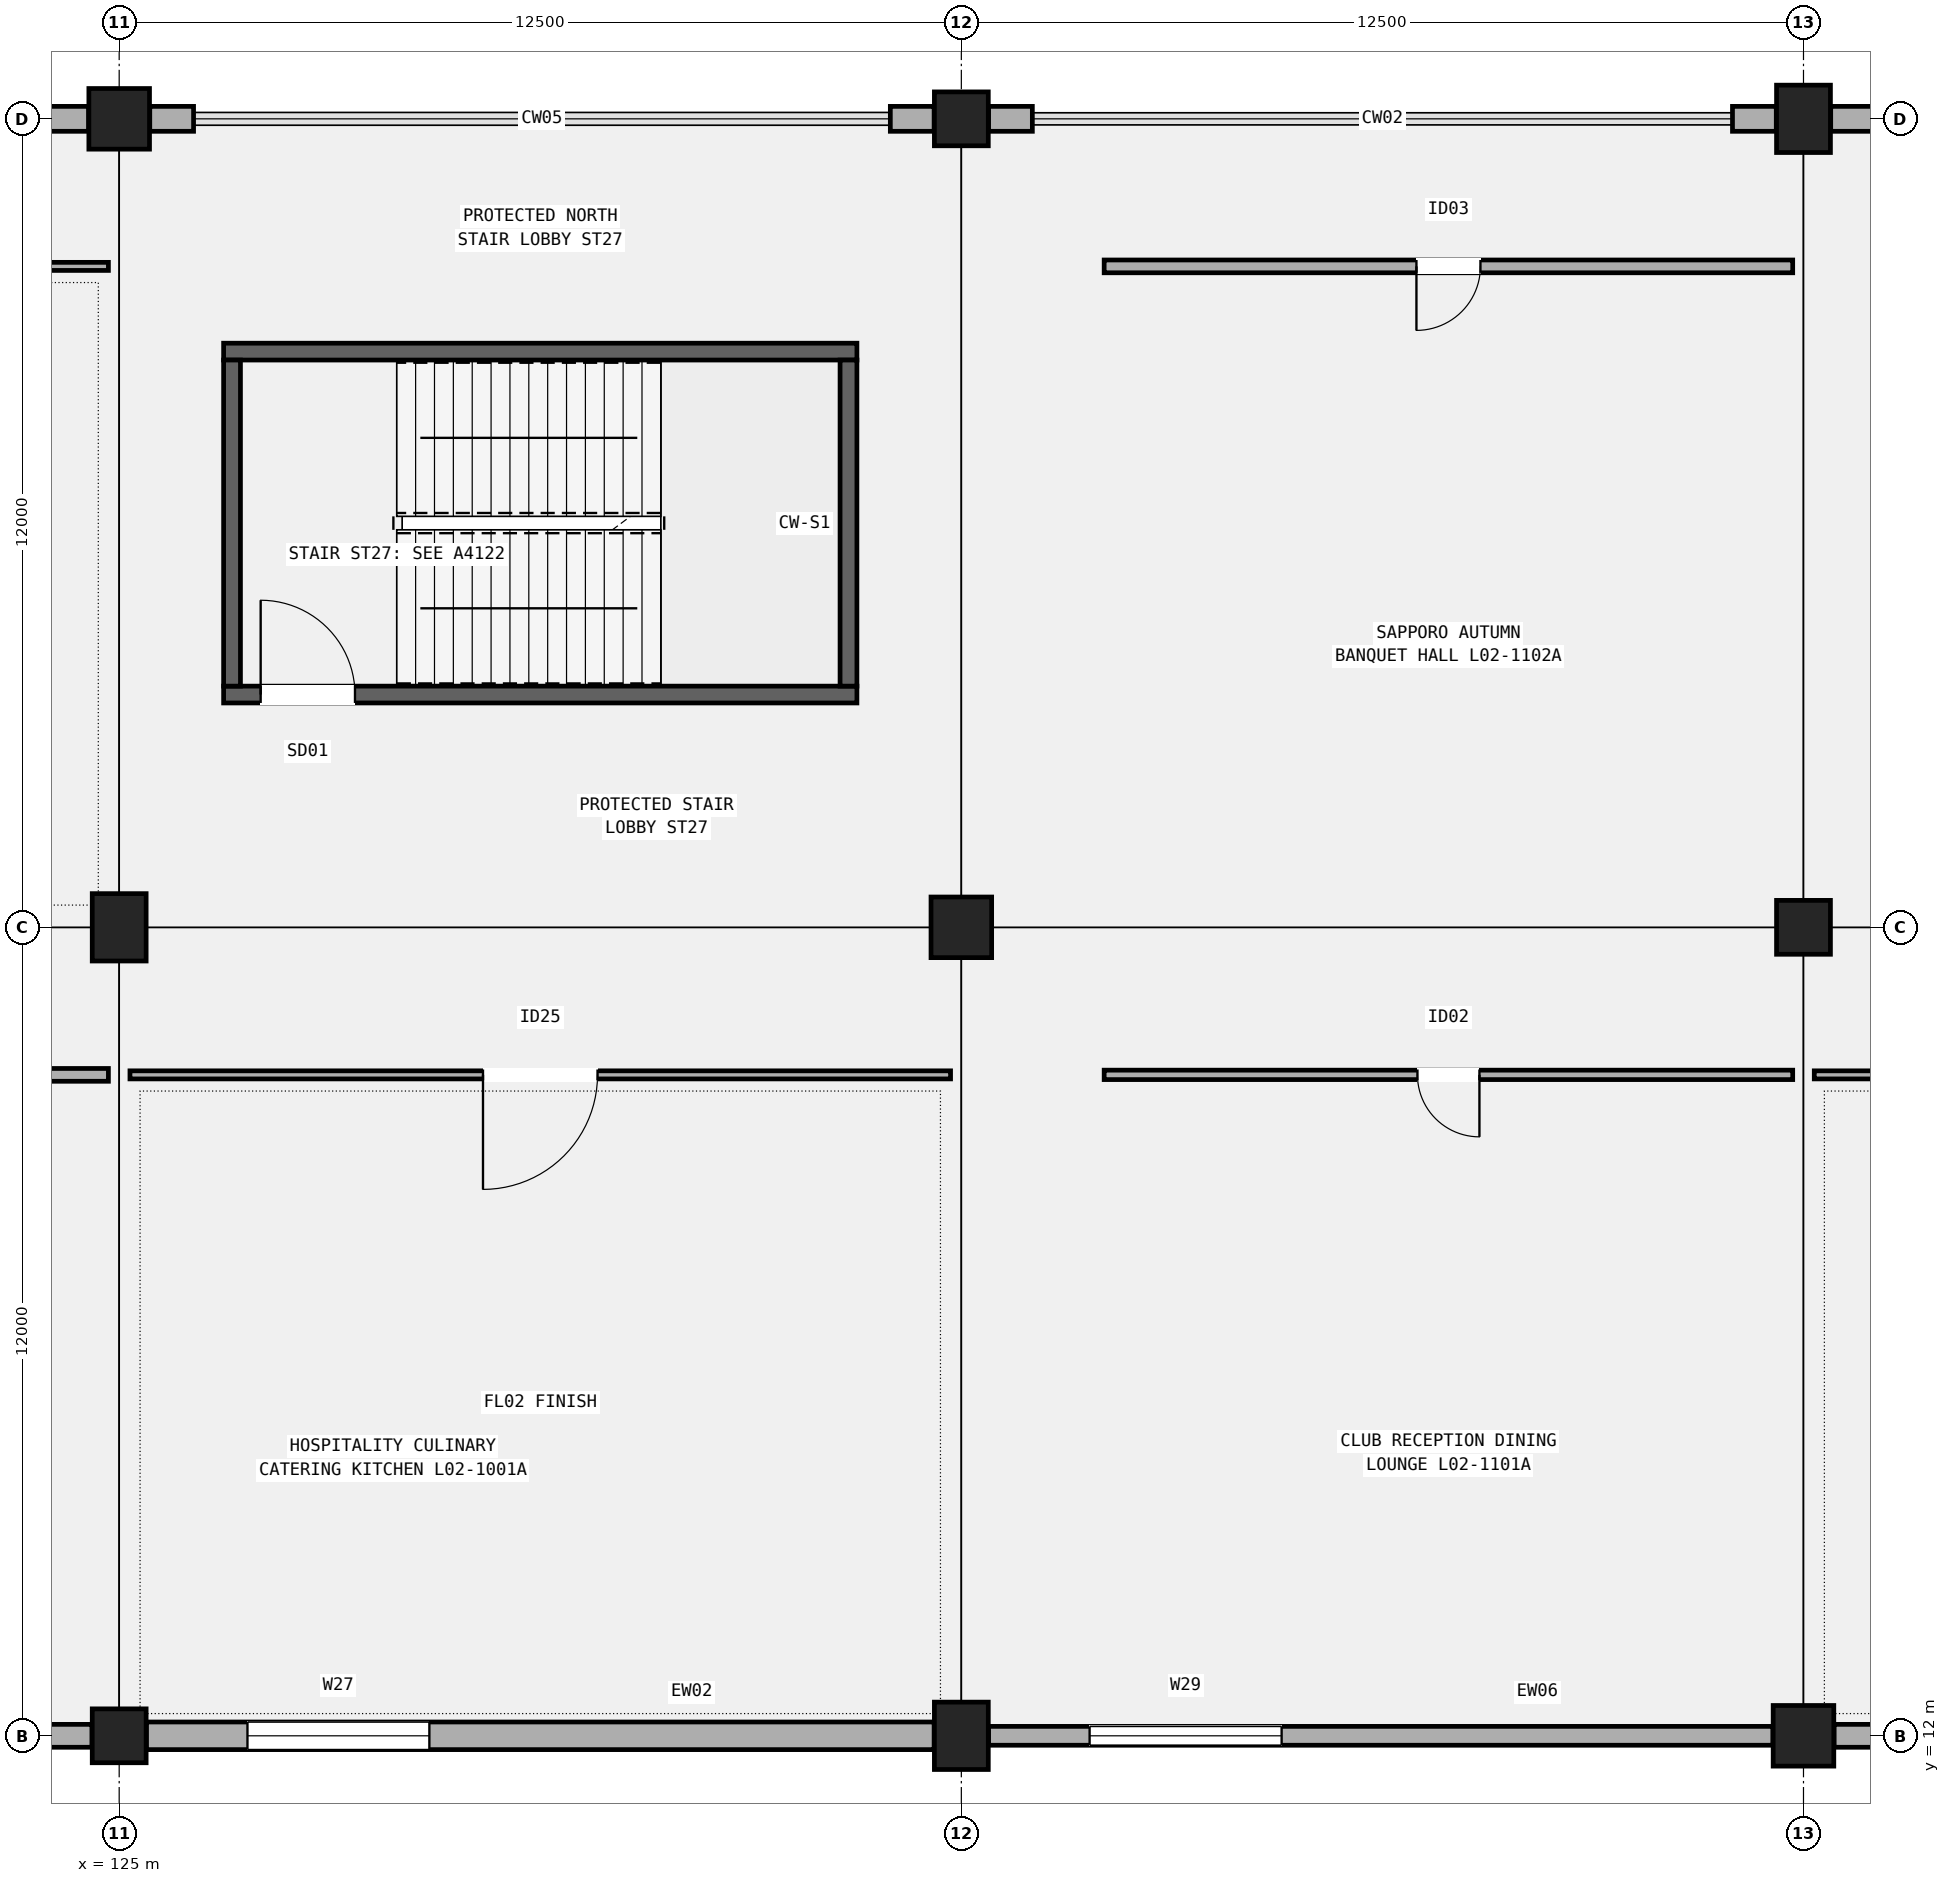
"""IFC4 building model, lengths in metres.
Left out: names, types, materials, properties, quantities, classifications, styles, units other than length and angle.
Written with IfcOpenShell. Run it as: python <this file> out.ifc"""

import sys

from ifc_helpers import new_model, si_unit, direction, frame, frame_2d, origin, origin_2d, place, context, subcontext, project, spatial, rectangle, extrude, element, fill, save


model = new_model("IFC4")
c1 = context("Model", 3, precision=1e-05, world=origin(), true_north=direction((0.0, 1.0)))
c2 = subcontext(c1, "Body", "Model", "MODEL_VIEW")
j1 = project(units=[si_unit("LENGTHUNIT", "METRE"), si_unit("PLANEANGLEUNIT", "RADIAN")], contexts=[c1])
p1 = place(None, origin())
s1 = spatial("IfcSite", under=j1, at=p1, CompositionType="ELEMENT")
p2 = place(p1, origin())
s2 = spatial("IfcBuilding", under=s1, at=p2, CompositionType="ELEMENT")
p3 = place(p2, frame((0.0, 0.0, 10.2)))
s3 = spatial("IfcBuildingStorey", under=s2, at=p3, CompositionType="ELEMENT", Elevation=10.2)
p4 = place(p3, frame((125.0, 12.0, 0.0), z_axis=(0.0, 0.0, 1.0), x_axis=(1.0, 0.0, 0.0)))
e1 = element("IfcColumn", 1, at=p4, inside=s3, PredefinedType="COLUMN", context=c2, shape_type="SweptSolid", body=[
    extrude(rectangle(XDim=0.8, YDim=0.8, at=origin_2d()), origin(), (0.0, 0.0, 1.0), 5.1),
])
p5 = place(p3, frame((125.0, 24.0, 0.0), z_axis=(0.0, 0.0, 1.0), x_axis=(1.0, 0.0, 0.0)))
e2 = element("IfcColumn", 2, at=p5, inside=s3, PredefinedType="COLUMN", context=c2, shape_type="SweptSolid", body=[
    extrude(rectangle(XDim=0.8, YDim=1.0, at=origin_2d()), origin(), (0.0, 0.0, 1.0), 5.1),
])
p6 = place(p3, frame((125.0, 36.0, 0.0), z_axis=(0.0, 0.0, 1.0), x_axis=(1.0, 0.0, 0.0)))
e3 = element("IfcColumn", 3, at=p6, inside=s3, PredefinedType="COLUMN", context=c2, shape_type="SweptSolid", body=[
    extrude(rectangle(XDim=0.9, YDim=0.9, at=origin_2d()), origin(), (0.0, 0.0, 1.0), 5.1),
])
p7 = place(p3, frame((137.5, 12.0, 0.0), z_axis=(0.0, 0.0, 1.0), x_axis=(1.0, 0.0, 0.0)))
e4 = element("IfcColumn", 4, at=p7, inside=s3, PredefinedType="COLUMN", context=c2, shape_type="SweptSolid", body=[
    extrude(rectangle(XDim=0.8, YDim=1.0, at=origin_2d()), origin(), (0.0, 0.0, 1.0), 5.1),
])
p8 = place(p3, frame((137.5, 24.0, 0.0), z_axis=(0.0, 0.0, 1.0), x_axis=(1.0, 0.0, 0.0)))
e5 = element("IfcColumn", 5, at=p8, inside=s3, PredefinedType="COLUMN", context=c2, shape_type="SweptSolid", body=[
    extrude(rectangle(XDim=0.9, YDim=0.9, at=origin_2d()), origin(), (0.0, 0.0, 1.0), 5.1),
])
p9 = place(p3, frame((137.5, 36.0, 0.0), z_axis=(0.0, 0.0, 1.0), x_axis=(1.0, 0.0, 0.0)))
e6 = element("IfcColumn", 6, at=p9, inside=s3, PredefinedType="COLUMN", context=c2, shape_type="SweptSolid", body=[
    extrude(rectangle(XDim=0.8, YDim=0.8, at=origin_2d()), origin(), (0.0, 0.0, 1.0), 5.1),
])
p10 = place(p3, frame((150.0, 12.0, 0.0), z_axis=(0.0, 0.0, 1.0), x_axis=(1.0, 0.0, 0.0)))
e7 = element("IfcColumn", 7, at=p10, inside=s3, PredefinedType="COLUMN", context=c2, shape_type="SweptSolid", body=[
    extrude(rectangle(XDim=0.9, YDim=0.9, at=origin_2d()), origin(), (0.0, 0.0, 1.0), 5.1),
])
p11 = place(p3, frame((150.0, 24.0, 0.0), z_axis=(0.0, 0.0, 1.0), x_axis=(1.0, 0.0, 0.0)))
e8 = element("IfcColumn", 8, at=p11, inside=s3, PredefinedType="COLUMN", context=c2, shape_type="SweptSolid", body=[
    extrude(rectangle(XDim=0.8, YDim=0.8, at=origin_2d()), origin(), (0.0, 0.0, 1.0), 5.1),
])
p12 = place(p3, frame((150.0, 36.0, 0.0), z_axis=(0.0, 0.0, 1.0), x_axis=(1.0, 0.0, 0.0)))
e9 = element("IfcColumn", 9, at=p12, inside=s3, PredefinedType="COLUMN", context=c2, shape_type="SweptSolid", body=[
    extrude(rectangle(XDim=0.8, YDim=1.0, at=origin_2d()), origin(), (0.0, 0.0, 1.0), 5.1),
])
p13 = place(p3, frame((112.454, 12.0, 0.0), z_axis=(0.0, 0.0, 1.0), x_axis=(1.0, 0.0, 0.0)))
e10 = element("IfcWall", 10, at=p13, inside=s3, PredefinedType="SOLIDWALL", context=c2, shape_type="SweptSolid", body=[
    extrude(rectangle(XDim=12.142, YDim=0.34, at=frame_2d((6.071, 0.0))), origin(), (0.0, 0.0, 1.0), 4.12),
])
p14 = place(p13, frame((1.5, 0.0, 0.95)))
e11 = element("IfcOpeningElement", 11, at=p14, cuts=e10, PredefinedType="OPENING", context=c2, shape_type="SweptSolid", body=[
    extrude(rectangle(XDim=2.4, YDim=2.05, at=frame_2d((1.2, 1.025))), frame((0.0, 0.18, 0.0), z_axis=(0.0, -1.0, 0.0), x_axis=(1.0, 0.0, 0.0)), (0.0, 0.0, 1.0), 0.36),
])
p15 = place(p3, frame((123.896, 36.0, 0.0), z_axis=(0.0, 0.0, 1.0), x_axis=(1.0, 0.0, 0.0)))
e12 = element("IfcWall", 12, at=p15, inside=s3, PredefinedType="SOLIDWALL", context=c2, shape_type="SweptSolid", body=[
    extrude(rectangle(XDim=0.65, YDim=0.37, at=frame_2d((0.325, 0.0))), origin(), (0.0, 0.0, 1.0), 4.02),
])
p16 = place(p3, frame((125.404, 12.0, 0.0), z_axis=(0.0, 0.0, 1.0), x_axis=(1.0, 0.0, 0.0)))
e13 = element("IfcWall", 13, at=p16, inside=s3, PredefinedType="SOLIDWALL", context=c2, shape_type="SweptSolid", body=[
    extrude(rectangle(XDim=11.692, YDim=0.41, at=frame_2d((5.846, 0.0))), origin(), (0.0, 0.0, 1.0), 4.22),
])
p17 = place(p16, frame((1.5, 0.0, 0.95)))
e14 = element("IfcOpeningElement", 14, at=p17, cuts=e13, PredefinedType="OPENING", context=c2, shape_type="SweptSolid", body=[
    extrude(rectangle(XDim=2.7, YDim=1.75, at=frame_2d((1.35, 0.875))), frame((0.0, 0.215, 0.0), z_axis=(0.0, -1.0, 0.0), x_axis=(1.0, 0.0, 0.0)), (0.0, 0.0, 1.0), 0.43),
])
for number, where, z_axis, x_axis in (
    (15, (125.454, 36.0, 0.0), (0.0, 0.0, 1.0), (1.0, 0.0, 0.0)),
    (16, (136.446, 36.0, 0.0), (0.0, 0.0, 1.0), (1.0, 0.0, 0.0)),
):
    element("IfcWall", number, at=place(p3, frame(where, z_axis=z_axis, x_axis=x_axis)), inside=s3, PredefinedType="SOLIDWALL", context=c2, shape_type="SweptSolid", body=[
        extrude(rectangle(XDim=0.65, YDim=0.37, at=frame_2d((0.325, 0.0))), origin(), (0.0, 0.0, 1.0), 4.12),
    ])
p18 = place(p3, frame((137.904, 12.0, 0.0), z_axis=(0.0, 0.0, 1.0), x_axis=(1.0, 0.0, 0.0)))
e17 = element("IfcWall", 17, at=p18, inside=s3, PredefinedType="SOLIDWALL", context=c2, shape_type="SweptSolid", body=[
    extrude(rectangle(XDim=11.642, YDim=0.28, at=frame_2d((5.821, 0.0))), origin(), (0.0, 0.0, 1.0), 4.02),
])
p19 = place(p18, frame((1.5, 0.0, 0.95)))
e18 = element("IfcOpeningElement", 18, at=p19, cuts=e17, PredefinedType="OPENING", context=c2, shape_type="SweptSolid", body=[
    extrude(rectangle(XDim=2.85, YDim=2.0, at=frame_2d((1.425, 1.0))), frame((0.0, 0.15, 0.0), z_axis=(0.0, -1.0, 0.0), x_axis=(1.0, 0.0, 0.0)), (0.0, 0.0, 1.0), 0.3),
])
for number, where, z_axis, x_axis in (
    (19, (137.904, 36.0, 0.0), (0.0, 0.0, 1.0), (1.0, 0.0, 0.0)),
    (20, (148.946, 36.0, 0.0), (0.0, 0.0, 1.0), (1.0, 0.0, 0.0)),
):
    element("IfcWall", number, at=place(p3, frame(where, z_axis=z_axis, x_axis=x_axis)), inside=s3, PredefinedType="SOLIDWALL", context=c2, shape_type="SweptSolid", body=[
        extrude(rectangle(XDim=0.65, YDim=0.37, at=frame_2d((0.325, 0.0))), origin(), (0.0, 0.0, 1.0), 4.22),
    ])
p20 = place(p3, frame((150.454, 12.0, 0.0), z_axis=(0.0, 0.0, 1.0), x_axis=(1.0, 0.0, 0.0)))
e21 = element("IfcWall", 21, at=p20, inside=s3, PredefinedType="SOLIDWALL", context=c2, shape_type="SweptSolid", body=[
    extrude(rectangle(XDim=11.642, YDim=0.34, at=frame_2d((5.821, 0.0))), origin(), (0.0, 0.0, 1.0), 4.12),
])
p21 = place(p20, frame((1.5, 0.0, 0.95)))
e22 = element("IfcOpeningElement", 22, at=p21, cuts=e21, PredefinedType="OPENING", context=c2, shape_type="SweptSolid", body=[
    extrude(rectangle(XDim=3.0, YDim=2.15, at=frame_2d((1.5, 1.075))), frame((0.0, 0.18, 0.0), z_axis=(0.0, -1.0, 0.0), x_axis=(1.0, 0.0, 0.0)), (0.0, 0.0, 1.0), 0.36),
])
p22 = place(p3, frame((150.404, 36.0, 0.0), z_axis=(0.0, 0.0, 1.0), x_axis=(1.0, 0.0, 0.0)))
e23 = element("IfcWall", 23, at=p22, inside=s3, PredefinedType="SOLIDWALL", context=c2, shape_type="SweptSolid", body=[
    extrude(rectangle(XDim=0.65, YDim=0.37, at=frame_2d((0.325, 0.0))), origin(), (0.0, 0.0, 1.0), 4.02),
])
p23 = place(p3, frame((126.55, 27.455, 0.0), z_axis=(0.0, 0.0, 1.0), x_axis=(1.0, 0.0, 0.0)))
e24 = element("IfcWall", 24, at=p23, inside=s3, PredefinedType="SHEAR", context=c2, shape_type="SweptSolid", body=[
    extrude(rectangle(XDim=9.4, YDim=0.25, at=frame_2d((4.7, 0.0))), origin(), (0.0, 0.0, 1.0), 4.82),
])
p24 = place(p23, frame((0.55, 0.0, 0.0)))
e25 = element("IfcOpeningElement", 25, at=p24, cuts=e24, PredefinedType="OPENING", context=c2, shape_type="SweptSolid", body=[
    extrude(rectangle(XDim=1.4, YDim=2.15, at=frame_2d((0.7, 1.075))), frame((0.0, 0.135, 0.0), z_axis=(0.0, -1.0, 0.0), x_axis=(1.0, 0.0, 0.0)), (0.0, 0.0, 1.0), 0.27),
])
p25 = place(p3, frame((126.55, 32.545, 0.0), z_axis=(0.0, 0.0, 1.0), x_axis=(1.0, 0.0, 0.0)))
e26 = element("IfcWall", 26, at=p25, inside=s3, PredefinedType="SHEAR", context=c2, shape_type="SweptSolid", body=[
    extrude(rectangle(XDim=9.4, YDim=0.25, at=frame_2d((4.7, 0.0))), origin(), (0.0, 0.0, 1.0), 4.82),
])
for number, where, z_axis, x_axis in (
    (27, (126.675, 27.58, 0.0), (0.0, 0.0, 1.0), (0.0, 1.0, 0.0)),
    (28, (135.825, 27.58, 0.0), (0.0, 0.0, 1.0), (0.0, 1.0, 0.0)),
):
    element("IfcWall", number, at=place(p3, frame(where, z_axis=z_axis, x_axis=x_axis)), inside=s3, PredefinedType="SHEAR", context=c2, shape_type="SweptSolid", body=[
        extrude(rectangle(XDim=4.84, YDim=0.25, at=frame_2d((2.42, 0.0))), origin(), (0.0, 0.0, 1.0), 4.82),
    ])
p26 = place(p3, frame((112.16, 21.81, 0.0), z_axis=(0.0, 0.0, 1.0), x_axis=(1.0, 0.0, 0.0)))
e29 = element("IfcWall", 29, at=p26, inside=s3, PredefinedType="PARTITIONING", context=c2, shape_type="SweptSolid", body=[
    extrude(rectangle(XDim=12.68, YDim=0.19, at=frame_2d((6.34, 0.0))), origin(), (0.0, 0.0, 1.0), 4.22),
])
p27 = place(p26, frame((7.1, 0.0, 0.0), z_axis=(0.0, 0.0, 1.0), x_axis=(-1.0, 0.0, 0.0)))
e30 = element("IfcOpeningElement", 30, at=p27, cuts=e29, PredefinedType="OPENING", context=c2, shape_type="SweptSolid", body=[
    extrude(rectangle(XDim=1.52, YDim=2.28, at=frame_2d((0.76, 1.14))), frame((0.0, 0.105, 0.0), z_axis=(0.0, -1.0, 0.0), x_axis=(1.0, 0.0, 0.0)), (0.0, 0.0, 1.0), 0.21),
])
p28 = place(p3, frame((112.16, 33.81, 0.0), z_axis=(0.0, 0.0, 1.0), x_axis=(1.0, 0.0, 0.0)))
e31 = element("IfcWall", 31, at=p28, inside=s3, PredefinedType="PARTITIONING", context=c2, shape_type="SweptSolid", body=[
    extrude(rectangle(XDim=12.68, YDim=0.12, at=frame_2d((6.34, 0.0))), origin(), (0.0, 0.0, 1.0), 4.22),
])
p29 = place(p28, frame((7.12, 0.0, 0.0), z_axis=(0.0, 0.0, 1.0), x_axis=(-1.0, 0.0, 0.0)))
e32 = element("IfcOpeningElement", 32, at=p29, cuts=e31, PredefinedType="OPENING", context=c2, shape_type="SweptSolid", body=[
    extrude(rectangle(XDim=1.56, YDim=2.26, at=frame_2d((0.78, 1.13))), frame((0.0, 0.07, 0.0), z_axis=(0.0, -1.0, 0.0), x_axis=(1.0, 0.0, 0.0)), (0.0, 0.0, 1.0), 0.14),
])
p30 = place(p3, frame((125.16, 21.81, 0.0), z_axis=(0.0, 0.0, 1.0), x_axis=(1.0, 0.0, 0.0)))
e33 = element("IfcWall", 33, at=p30, inside=s3, PredefinedType="PARTITIONING", context=c2, shape_type="SweptSolid", body=[
    extrude(rectangle(XDim=12.18, YDim=0.12, at=frame_2d((6.09, 0.0))), origin(), (0.0, 0.0, 1.0), 4.22),
])
p31 = place(p30, frame((6.94, 0.0, 0.0), z_axis=(0.0, 0.0, 1.0), x_axis=(-1.0, 0.0, 0.0)))
e34 = element("IfcOpeningElement", 34, at=p31, cuts=e33, PredefinedType="OPENING", context=c2, shape_type="SweptSolid", body=[
    extrude(rectangle(XDim=1.7, YDim=2.32, at=frame_2d((0.85, 1.16))), frame((0.0, 0.07, 0.0), z_axis=(0.0, -1.0, 0.0), x_axis=(1.0, 0.0, 0.0)), (0.0, 0.0, 1.0), 0.14),
])
p32 = place(p3, frame((139.62, 21.81, 0.0), z_axis=(0.0, 0.0, 1.0), x_axis=(1.0, 0.0, 0.0)))
e35 = element("IfcWall", 35, at=p32, inside=s3, PredefinedType="PARTITIONING", context=c2, shape_type="SweptSolid", body=[
    extrude(rectangle(XDim=10.22, YDim=0.14, at=frame_2d((5.11, 0.0))), origin(), (0.0, 0.0, 1.0), 4.22),
])
p33 = place(p32, frame((5.57, 0.0, 0.0), z_axis=(0.0, 0.0, 1.0), x_axis=(-1.0, 0.0, 0.0)))
e36 = element("IfcOpeningElement", 36, at=p33, cuts=e35, PredefinedType="OPENING", context=c2, shape_type="SweptSolid", body=[
    extrude(rectangle(XDim=0.92, YDim=2.1, at=frame_2d((0.46, 1.05))), frame((0.0, 0.08, 0.0), z_axis=(0.0, -1.0, 0.0), x_axis=(1.0, 0.0, 0.0)), (0.0, 0.0, 1.0), 0.16),
])
p34 = place(p3, frame((139.62, 33.81, 0.0), z_axis=(0.0, 0.0, 1.0), x_axis=(1.0, 0.0, 0.0)))
e37 = element("IfcWall", 37, at=p34, inside=s3, PredefinedType="PARTITIONING", context=c2, shape_type="SweptSolid", body=[
    extrude(rectangle(XDim=10.22, YDim=0.19, at=frame_2d((5.11, 0.0))), origin(), (0.0, 0.0, 1.0), 4.22),
])
p35 = place(p34, frame((5.585, 0.0, 0.0), z_axis=(0.0, 0.0, 1.0), x_axis=(-1.0, 0.0, 0.0)))
e38 = element("IfcOpeningElement", 38, at=p35, cuts=e37, PredefinedType="OPENING", context=c2, shape_type="SweptSolid", body=[
    extrude(rectangle(XDim=0.95, YDim=2.12, at=frame_2d((0.475, 1.06))), frame((0.0, 0.105, 0.0), z_axis=(0.0, -1.0, 0.0), x_axis=(1.0, 0.0, 0.0)), (0.0, 0.0, 1.0), 0.21),
])
p36 = place(p3, frame((150.16, 21.81, 0.0), z_axis=(0.0, 0.0, 1.0), x_axis=(1.0, 0.0, 0.0)))
e39 = element("IfcWall", 39, at=p36, inside=s3, PredefinedType="PARTITIONING", context=c2, shape_type="SweptSolid", body=[
    extrude(rectangle(XDim=12.18, YDim=0.12, at=frame_2d((6.09, 0.0))), origin(), (0.0, 0.0, 1.0), 4.22),
])
p37 = place(p36, frame((6.605, 0.0, 0.0), z_axis=(0.0, 0.0, 1.0), x_axis=(-1.0, 0.0, 0.0)))
e40 = element("IfcOpeningElement", 40, at=p37, cuts=e39, PredefinedType="OPENING", context=c2, shape_type="SweptSolid", body=[
    extrude(rectangle(XDim=1.03, YDim=2.12, at=frame_2d((0.515, 1.06))), frame((0.0, 0.07, 0.0), z_axis=(0.0, -1.0, 0.0), x_axis=(1.0, 0.0, 0.0)), (0.0, 0.0, 1.0), 0.14),
])
p38 = place(p17, origin())
e41 = element("IfcWindow", 41, at=p38, inside=s3, PartitioningType="SINGLE_PANEL", PredefinedType="WINDOW", context=c2, shape_type="SweptSolid", body=[
    extrude(rectangle(XDim=2.7, YDim=1.75, at=frame_2d((1.35, 0.875))), frame((0.0, 0.03, 0.0), z_axis=(0.0, -1.0, 0.0), x_axis=(1.0, 0.0, 0.0)), (0.0, 0.0, 1.0), 0.06),
])
fill(e14, e41)
p39 = place(p19, origin())
e42 = element("IfcWindow", 42, at=p39, inside=s3, PartitioningType="SINGLE_PANEL", PredefinedType="WINDOW", context=c2, shape_type="SweptSolid", body=[
    extrude(rectangle(XDim=2.85, YDim=2.0, at=frame_2d((1.425, 1.0))), frame((0.0, 0.03, 0.0), z_axis=(0.0, -1.0, 0.0), x_axis=(1.0, 0.0, 0.0)), (0.0, 0.0, 1.0), 0.06),
])
fill(e18, e42)
p40 = place(p24, origin())
e43 = element("IfcDoor", 43, at=p40, inside=s3, OperationType="SINGLE_SWING_LEFT", PredefinedType="DOOR", context=c2, shape_type="SweptSolid", body=[
    extrude(rectangle(XDim=1.4, YDim=2.15, at=frame_2d((0.7, 1.075))), frame((0.0, 0.025, 0.0), z_axis=(0.0, -1.0, 0.0), x_axis=(1.0, 0.0, 0.0)), (0.0, 0.0, 1.0), 0.05),
])
fill(e25, e43)
p41 = place(p31, origin())
e44 = element("IfcDoor", 44, at=p41, inside=s3, OperationType="SINGLE_SWING_RIGHT", PredefinedType="DOOR", context=c2, shape_type="SweptSolid", body=[
    extrude(rectangle(XDim=1.7, YDim=2.32, at=frame_2d((0.85, 1.16))), frame((0.0, 0.025, 0.0), z_axis=(0.0, -1.0, 0.0), x_axis=(1.0, 0.0, 0.0)), (0.0, 0.0, 1.0), 0.05),
])
fill(e34, e44)
p42 = place(p33, origin())
e45 = element("IfcDoor", 45, at=p42, inside=s3, OperationType="SINGLE_SWING_LEFT", PredefinedType="DOOR", context=c2, shape_type="SweptSolid", body=[
    extrude(rectangle(XDim=0.92, YDim=2.1, at=frame_2d((0.46, 1.05))), frame((0.0, 0.025, 0.0), z_axis=(0.0, -1.0, 0.0), x_axis=(1.0, 0.0, 0.0)), (0.0, 0.0, 1.0), 0.05),
])
fill(e36, e45)
p43 = place(p35, origin())
e46 = element("IfcDoor", 46, at=p43, inside=s3, OperationType="SINGLE_SWING_RIGHT", PredefinedType="DOOR", context=c2, shape_type="SweptSolid", body=[
    extrude(rectangle(XDim=0.95, YDim=2.12, at=frame_2d((0.475, 1.06))), frame((0.0, 0.025, 0.0), z_axis=(0.0, -1.0, 0.0), x_axis=(1.0, 0.0, 0.0)), (0.0, 0.0, 1.0), 0.05),
])
fill(e38, e46)
save(model, sys.argv[1])
